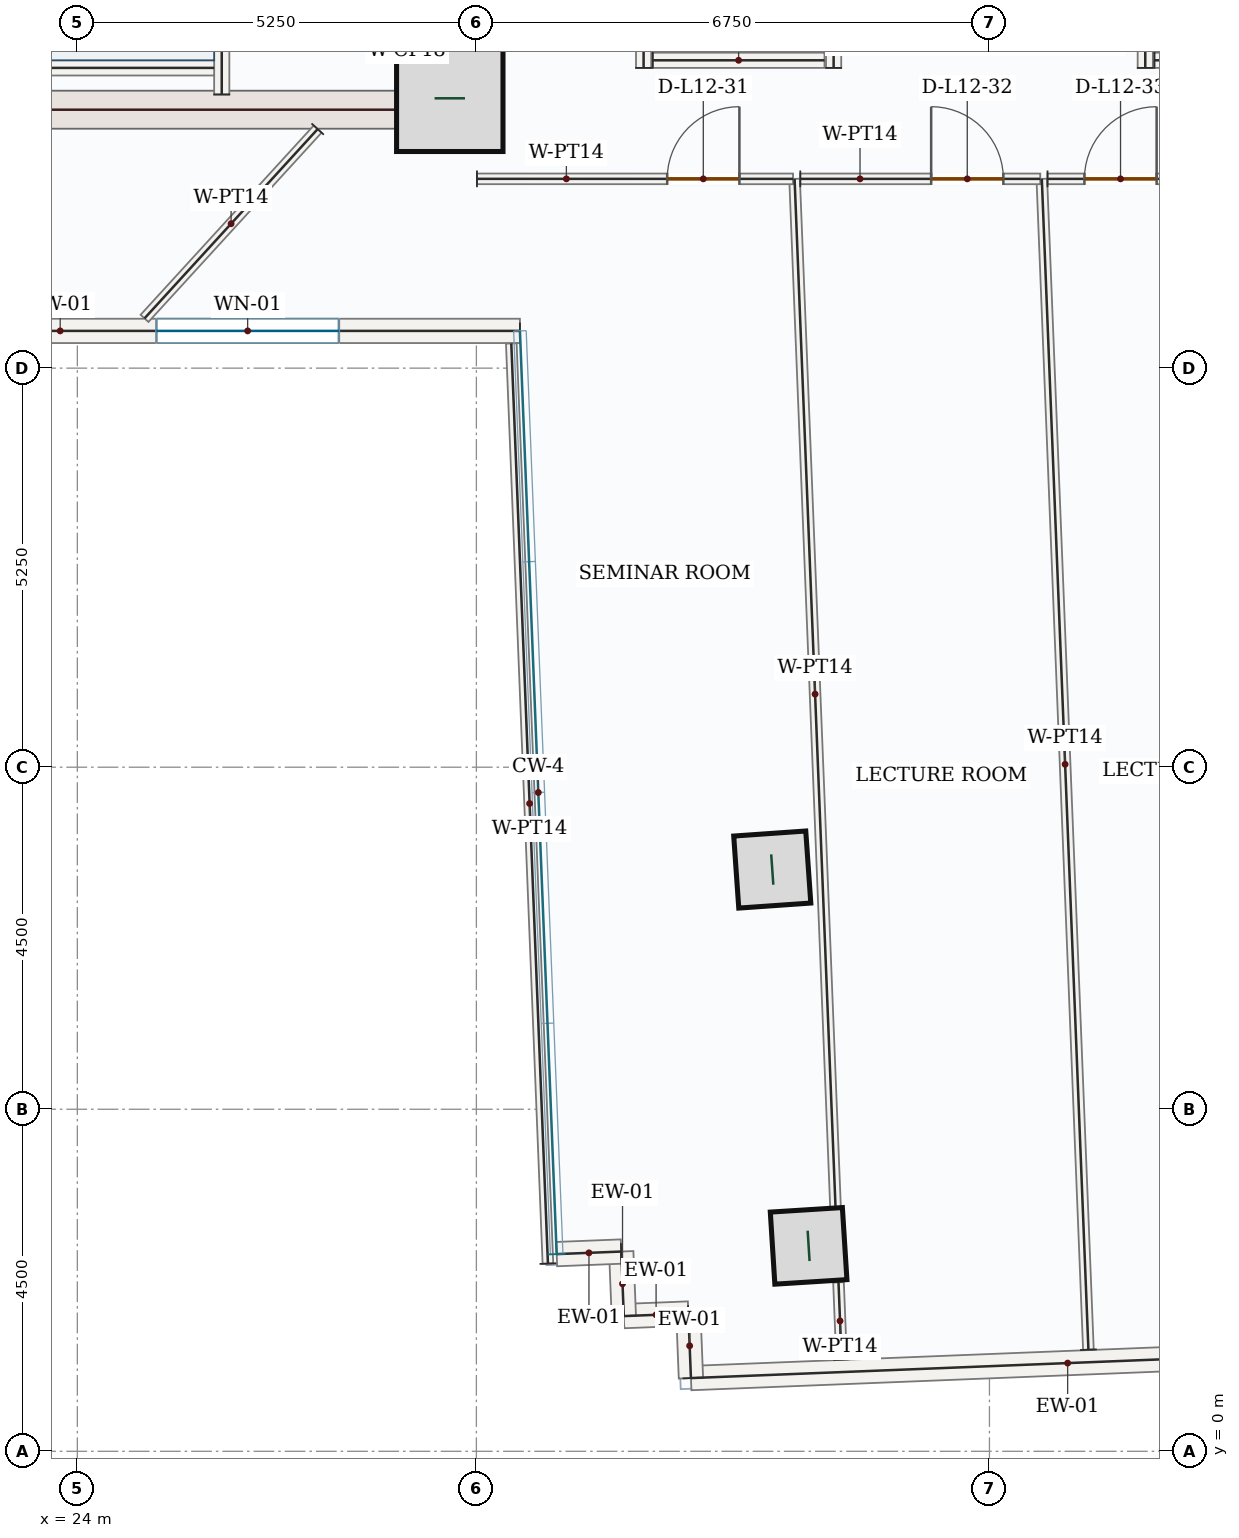
"""IFC4 building model, lengths in metres.
Left out: names, types, materials, properties, quantities, classifications, styles, units other than length and angle.
Written with IfcOpenShell. Run it as: python <this file> out.ifc"""

import sys

from ifc_helpers import new_model, si_unit, direction, frame, frame_2d, origin, origin_2d, place, context, subcontext, project, spatial, rectangle, hollow_rectangle, extrude, source, transform, mapped, element, fill, save


model = new_model("IFC4")
c1 = context("Model", 3, precision=1e-05, world=origin(), true_north=direction((0.0, 1.0)))
c2 = subcontext(c1, "Body", "Model", "MODEL_VIEW")
j1 = project(units=[si_unit("LENGTHUNIT", "METRE"), si_unit("PLANEANGLEUNIT", "RADIAN")], contexts=[c1])
p1 = place(None, origin())
s1 = spatial("IfcSite", under=j1, at=p1, CompositionType="ELEMENT")
p2 = place(p1, origin())
s2 = spatial("IfcBuilding", under=s1, at=p2, CompositionType="ELEMENT")
p3 = place(p2, frame((0.0, 0.0, 58.5)))
s3 = spatial("IfcBuildingStorey", under=s2, at=p3, CompositionType="ELEMENT", Elevation=58.5)
p4 = place(p3, frame((29.0, 17.4, 0.0), z_axis=(0.0, 0.0, 1.0), x_axis=(0.0, 1.0, 0.0)))
e1 = element("IfcWall", 1, at=p4, inside=s3, PredefinedType="SHEAR", context=c2, shape_type="SweptSolid", body=[
    extrude(rectangle(XDim=8.55, YDim=0.5, at=frame_2d((4.275, 0.0))), origin(), (0.0, 0.0, 1.0), 3.95),
])
p5 = place(p4, frame((6.65, 0.0, 0.0)))
e2 = element("IfcOpeningElement", 2, at=p5, cuts=e1, PredefinedType="OPENING", context=c2, shape_type="SweptSolid", body=[
    extrude(rectangle(XDim=1.1, YDim=2.2, at=frame_2d((0.55, 1.1))), frame((0.0, 0.26, 0.0), z_axis=(0.0, -1.0, 0.0), x_axis=(1.0, 0.0, 0.0)), (0.0, 0.0, 1.0), 0.52),
])
p6 = place(p4, frame((2.7, 0.0, 0.0)))
e3 = element("IfcOpeningElement", 3, at=p6, cuts=e1, PredefinedType="OPENING", context=c2, shape_type="SweptSolid", body=[
    extrude(rectangle(XDim=0.88, YDim=2.1, at=frame_2d((0.44, 1.05))), frame((0.0, 0.26, 0.0), z_axis=(0.0, -1.0, 0.0), x_axis=(1.0, 0.0, 0.0)), (0.0, 0.0, 1.0), 0.52),
])
p7 = place(p4, frame((4.6, 0.0, 0.0)))
e4 = element("IfcOpeningElement", 4, at=p7, cuts=e1, PredefinedType="OPENING", context=c2, shape_type="SweptSolid", body=[
    extrude(rectangle(XDim=0.88, YDim=2.1, at=frame_2d((0.44, 1.05))), frame((0.0, 0.26, 0.0), z_axis=(0.0, -1.0, 0.0), x_axis=(1.0, 0.0, 0.0)), (0.0, 0.0, 1.0), 0.52),
])
m1 = source(origin(), c2, "Body", "SweptSolid", [
    extrude(rectangle(XDim=7.0, YDim=0.5, at=frame_2d((3.5, 0.0))), origin(), (0.0, 0.0, 1.0), 3.95),
])
p8 = place(p3, frame((21.75, 17.65, 0.0), z_axis=(0.0, 0.0, 1.0), x_axis=(1.0, 0.0, 0.0)))
e5 = element("IfcWall", 5, at=p8, inside=s3, PredefinedType="SHEAR", context=c2, shape_type="MappedRepresentation", body=[
    mapped(m1, transform((0.0, 0.0, 0.0), x_axis=(1.0, 0.0, 0.0), y_axis=(0.0, 1.0, 0.0), z_axis=(0.0, 0.0, 1.0), scale=1.0)),
])
m2 = source(origin(), c2, "Body", "SweptSolid", [
    extrude(rectangle(XDim=1.4, YDim=1.4, at=origin_2d()), origin(), (0.0, 0.0, 1.0), 4.2),
])
p9 = place(p3, frame((28.9, 17.8, 0.0), z_axis=(0.0, 0.0, 1.0), x_axis=(1.0, 0.0, 0.0)))
e6 = element("IfcColumn", 6, at=p9, inside=s3, PredefinedType="COLUMN", context=c2, shape_type="MappedRepresentation", body=[
    mapped(m2, transform((0.0, 0.0, 0.0), x_axis=(1.0, 0.0, 0.0), y_axis=(0.0, 1.0, 0.0), z_axis=(0.0, 0.0, 1.0), scale=1.0)),
])
m3 = source(origin(), c2, "Body", "SweptSolid", [
    extrude(hollow_rectangle(XDim=0.95, YDim=0.95, WallThickness=0.05, at=origin_2d()), origin(), (0.0, 0.0, 1.0), 4.2),
])
for number, where, z_axis, x_axis in (
    (7, (33.143, 7.654, 0.0), (0.0, 0.0, 1.0), (-0.07, 0.998, 0.0)),
    (8, (33.621, 2.703, 0.0), (0.0, 0.0, 1.0), (-0.063, 0.998, 0.0)),
):
    element("IfcColumn", number, at=place(p3, frame(where, z_axis=z_axis, x_axis=x_axis)), inside=s3, PredefinedType="COLUMN", context=c2, shape_type="MappedRepresentation", body=[
        mapped(m3, transform((0.0, 0.0, 0.0), x_axis=(1.0, 0.0, 0.0), y_axis=(0.0, 1.0, 0.0), z_axis=(0.0, 0.0, 1.0), scale=1.0)),
    ])
m4 = source(origin(), c2, "Body", "SweptSolid", [
    extrude(rectangle(XDim=9.92, YDim=0.32, at=frame_2d((4.96, 0.0))), origin(), (0.0, 0.0, 1.0), 3.95),
])
p10 = place(p3, frame((41.985, 1.358, 0.0), z_axis=(0.0, 0.0, 1.0), x_axis=(-0.999207823998, -0.039796035749, 0.0)))
e9 = element("IfcWall", 9, at=p10, inside=s3, PredefinedType="SOLIDWALL", context=c2, shape_type="MappedRepresentation", body=[
    mapped(m4, transform((0.0, 0.0, 0.0), x_axis=(1.0, 0.0, 0.0), y_axis=(0.0, 1.0, 0.0), z_axis=(0.0, 0.0, 1.0), scale=1.0)),
])
m5 = source(origin(), c2, "Body", "SweptSolid", [
    extrude(rectangle(XDim=0.85, YDim=0.32, at=frame_2d((0.425, 0.0))), origin(), (0.0, 0.0, 1.0), 3.95),
])
p11 = place(p3, frame((32.073, 0.963, 0.0), z_axis=(0.0, 0.0, 1.0), x_axis=(-0.039922158152, 0.999202792875, 0.0)))
e10 = element("IfcWall", 10, at=p11, inside=s3, PredefinedType="SOLIDWALL", context=c2, shape_type="MappedRepresentation", body=[
    mapped(m5, transform((0.0, 0.0, 0.0), x_axis=(1.0, 0.0, 0.0), y_axis=(0.0, 1.0, 0.0), z_axis=(0.0, 0.0, 1.0), scale=1.0)),
])
m6 = source(origin(), c2, "Body", "SweptSolid", [
    extrude(rectangle(XDim=0.85, YDim=0.32, at=frame_2d((0.425, 0.0))), origin(), (0.0, 0.0, 1.0), 3.95),
])
for number, where, z_axis, x_axis in (
    (11, (32.039, 1.812, 0.0), (0.0, 0.0, 1.0), (-0.999, -0.04, 0.0)),
    (12, (31.19, 1.779, 0.0), (0.0, 0.0, 1.0), (-0.04, 0.999, 0.0)),
):
    element("IfcWall", number, at=place(p3, frame(where, z_axis=z_axis, x_axis=x_axis)), inside=s3, PredefinedType="SOLIDWALL", context=c2, shape_type="MappedRepresentation", body=[
        mapped(m6, transform((0.0, 0.0, 0.0), x_axis=(1.0, 0.0, 0.0), y_axis=(0.0, 1.0, 0.0), z_axis=(0.0, 0.0, 1.0), scale=1.0)),
    ])
p12 = place(p3, frame((31.156, 2.628, 0.0), z_axis=(0.0, 0.0, 1.0), x_axis=(-0.999214208752, -0.039635401209, 0.0)))
e13 = element("IfcWall", 13, at=p12, inside=s3, PredefinedType="SOLIDWALL", context=c2, shape_type="MappedRepresentation", body=[
    mapped(m5, transform((0.0, 0.0, 0.0), x_axis=(1.0, 0.0, 0.0), y_axis=(0.0, 1.0, 0.0), z_axis=(0.0, 0.0, 1.0), scale=1.0)),
])
p13 = place(p3, frame((29.823, 14.74, 0.0), z_axis=(0.0, 0.0, 1.0), x_axis=(-1.0, 0.0, 0.0)))
e14 = element("IfcWall", 14, at=p13, inside=s3, PredefinedType="SOLIDWALL", context=c2, shape_type="SweptSolid", body=[
    extrude(rectangle(XDim=7.165, YDim=0.32, at=frame_2d((3.583, 0.0))), origin(), (0.0, 0.0, 1.0), 3.95),
])
p14 = place(p13, frame((2.382, 0.0, 0.85)))
e15 = element("IfcOpeningElement", 15, at=p14, cuts=e14, PredefinedType="OPENING", context=c2, shape_type="SweptSolid", body=[
    extrude(rectangle(XDim=2.4, YDim=1.8, at=frame_2d((1.2, 0.9))), frame((0.0, 0.17, 0.0), z_axis=(0.0, -1.0, 0.0), x_axis=(1.0, 0.0, 0.0)), (0.0, 0.0, 1.0), 0.34),
])
p15 = place(p3, frame((25.9, 17.85, 0.0), z_axis=(0.0, 0.0, 1.0), x_axis=(0.0, 1.0, 0.0)))
e16 = element("IfcWall", 16, at=p15, inside=s3, PredefinedType="SOLIDWALL", context=c2, shape_type="SweptSolid", body=[
    extrude(rectangle(XDim=8.0, YDim=0.2, at=frame_2d((4.0, 0.0))), origin(), (0.0, 0.0, 1.0), 3.95),
])
p16 = place(p15, frame((6.3, 0.0, 0.0)))
e17 = element("IfcOpeningElement", 17, at=p16, cuts=e16, PredefinedType="OPENING", context=c2, shape_type="SweptSolid", body=[
    extrude(rectangle(XDim=1.05, YDim=2.15, at=frame_2d((0.525, 1.075))), frame((0.0, 0.11, 0.0), z_axis=(0.0, -1.0, 0.0), x_axis=(1.0, 0.0, 0.0)), (0.0, 0.0, 1.0), 0.22),
])
m7 = source(origin(), c2, "Body", "SweptSolid", [
    extrude(rectangle(XDim=3.25, YDim=0.2, at=frame_2d((1.625, 0.0))), origin(), (0.0, 0.0, 1.0), 3.95),
])
p17 = place(p3, frame((22.55, 18.2, 0.0), z_axis=(0.0, 0.0, 1.0), x_axis=(1.0, 0.0, 0.0)))
e18 = element("IfcWall", 18, at=p17, inside=s3, PredefinedType="SOLIDWALL", context=c2, shape_type="MappedRepresentation", body=[
    mapped(m7, transform((0.0, 0.0, 0.0), x_axis=(1.0, 0.0, 0.0), y_axis=(0.0, 1.0, 0.0), z_axis=(0.0, 0.0, 1.0), scale=1.0)),
])
m8 = source(origin(), c2, "Body", "SweptSolid", [
    extrude(rectangle(XDim=2.35, YDim=0.2, at=frame_2d((1.175, 0.0))), origin(), (0.0, 0.0, 1.0), 3.95),
])
for number, where, z_axis, x_axis in (
    (19, (31.45, 18.2, 0.0), (0.0, 0.0, 1.0), (0.0, 1.0, 0.0)),
    (20, (33.95, 18.2, 0.0), (0.0, 0.0, 1.0), (0.0, 1.0, 0.0)),
):
    element("IfcWall", number, at=place(p3, frame(where, z_axis=z_axis, x_axis=x_axis)), inside=s3, PredefinedType="SOLIDWALL", context=c2, shape_type="MappedRepresentation", body=[
        mapped(m8, transform((0.0, 0.0, 0.0), x_axis=(1.0, 0.0, 0.0), y_axis=(0.0, 1.0, 0.0), z_axis=(0.0, 0.0, 1.0), scale=1.0)),
    ])
m9 = source(origin(), c2, "Body", "SweptSolid", [
    extrude(rectangle(XDim=2.26, YDim=0.2, at=frame_2d((1.13, 0.0))), origin(), (0.0, 0.0, 1.0), 3.95),
])
p18 = place(p3, frame((31.57, 18.3, 0.0), z_axis=(0.0, 0.0, 1.0), x_axis=(1.0, 0.0, 0.0)))
e21 = element("IfcWall", 21, at=p18, inside=s3, PredefinedType="SOLIDWALL", context=c2, shape_type="MappedRepresentation", body=[
    mapped(m9, transform((0.0, 0.0, 0.0), x_axis=(1.0, 0.0, 0.0), y_axis=(0.0, 1.0, 0.0), z_axis=(0.0, 0.0, 1.0), scale=1.0)),
])
p19 = place(p3, frame((38.05, 18.2, 0.0), z_axis=(0.0, 0.0, 1.0), x_axis=(0.0, 1.0, 0.0)))
e22 = element("IfcWall", 22, at=p19, inside=s3, PredefinedType="SOLIDWALL", context=c2, shape_type="MappedRepresentation", body=[
    mapped(m8, transform((0.0, 0.0, 0.0), x_axis=(1.0, 0.0, 0.0), y_axis=(0.0, 1.0, 0.0), z_axis=(0.0, 0.0, 1.0), scale=1.0)),
])
p20 = place(p3, frame((38.17, 18.3, 0.0), z_axis=(0.0, 0.0, 1.0), x_axis=(1.0, 0.0, 0.0)))
e23 = element("IfcWall", 23, at=p20, inside=s3, PredefinedType="SOLIDWALL", context=c2, shape_type="MappedRepresentation", body=[
    mapped(m9, transform((0.0, 0.0, 0.0), x_axis=(1.0, 0.0, 0.0), y_axis=(0.0, 1.0, 0.0), z_axis=(0.0, 0.0, 1.0), scale=1.0)),
])
m10 = source(origin(), c2, "Body", "SweptSolid", [
    extrude(rectangle(XDim=15.416, YDim=0.14, at=frame_2d((7.708, 0.0))), origin(), (0.0, 0.0, 1.0), 3.95),
])
p21 = place(p3, frame((37.302, 1.336, 0.0), z_axis=(0.0, 0.0, 1.0), x_axis=(-0.039782723686, 0.999208354096, 0.0)))
e24 = element("IfcWall", 24, at=p21, inside=s3, PredefinedType="PARTITIONING", context=c2, shape_type="MappedRepresentation", body=[
    mapped(m10, transform((0.0, 0.0, 0.0), x_axis=(1.0, 0.0, 0.0), y_axis=(0.0, 1.0, 0.0), z_axis=(0.0, 0.0, 1.0), scale=1.0)),
])
p22 = place(p3, frame((36.764, 16.74, 0.0), z_axis=(0.0, 0.0, 1.0), x_axis=(1.0, 0.0, 0.0)))
e25 = element("IfcWall", 25, at=p22, inside=s3, PredefinedType="PARTITIONING", context=c2, shape_type="SweptSolid", body=[
    extrude(rectangle(XDim=3.157, YDim=0.14, at=frame_2d((1.579, 0.0))), origin(), (0.0, 0.0, 1.0), 3.95),
])
p23 = place(p22, frame((0.486, 0.0, 0.0)))
e26 = element("IfcOpeningElement", 26, at=p23, cuts=e25, PredefinedType="OPENING", context=c2, shape_type="SweptSolid", body=[
    extrude(rectangle(XDim=0.95, YDim=2.15, at=frame_2d((0.475, 1.075))), frame((0.0, 0.08, 0.0), z_axis=(0.0, -1.0, 0.0), x_axis=(1.0, 0.0, 0.0)), (0.0, 0.0, 1.0), 0.16),
])
m11 = source(origin(), c2, "Body", "SweptSolid", [
    extrude(rectangle(XDim=1.016, YDim=0.14, at=frame_2d((0.508, 0.0))), origin(), (0.0, 0.0, 1.0), 3.95),
])
p24 = place(p3, frame((34.055, 1.207, 0.0), z_axis=(0.0, 0.0, 1.0), x_axis=(-0.03988168596, 0.99920440908, 0.0)))
e27 = element("IfcWall", 27, at=p24, inside=s3, PredefinedType="PARTITIONING", context=c2, shape_type="MappedRepresentation", body=[
    mapped(m11, transform((0.0, 0.0, 0.0), x_axis=(1.0, 0.0, 0.0), y_axis=(0.0, 1.0, 0.0), z_axis=(0.0, 0.0, 1.0), scale=1.0)),
])
m12 = source(origin(), c2, "Body", "SweptSolid", [
    extrude(rectangle(XDim=13.568, YDim=0.14, at=frame_2d((6.784, 0.0))), origin(), (0.0, 0.0, 1.0), 3.95),
])
p25 = place(p3, frame((33.976, 3.183, 0.0), z_axis=(0.0, 0.0, 1.0), x_axis=(-0.039766111253, 0.99920901537, 0.0)))
e28 = element("IfcWall", 28, at=p25, inside=s3, PredefinedType="PARTITIONING", context=c2, shape_type="MappedRepresentation", body=[
    mapped(m12, transform((0.0, 0.0, 0.0), x_axis=(1.0, 0.0, 0.0), y_axis=(0.0, 1.0, 0.0), z_axis=(0.0, 0.0, 1.0), scale=1.0)),
])
p26 = place(p3, frame((33.511, 16.74, 0.0), z_axis=(0.0, 0.0, 1.0), x_axis=(1.0, 0.0, 0.0)))
e29 = element("IfcWall", 29, at=p26, inside=s3, PredefinedType="PARTITIONING", context=c2, shape_type="SweptSolid", body=[
    extrude(rectangle(XDim=3.157, YDim=0.14, at=frame_2d((1.579, 0.0))), origin(), (0.0, 0.0, 1.0), 3.95),
])
p27 = place(p26, frame((1.722, 0.0, 0.0)))
e30 = element("IfcOpeningElement", 30, at=p27, cuts=e29, PredefinedType="OPENING", context=c2, shape_type="SweptSolid", body=[
    extrude(rectangle(XDim=0.95, YDim=2.15, at=frame_2d((0.475, 1.075))), frame((0.0, 0.08, 0.0), z_axis=(0.0, -1.0, 0.0), x_axis=(1.0, 0.0, 0.0)), (0.0, 0.0, 1.0), 0.16),
])
m13 = source(origin(), c2, "Body", "SweptSolid", [
    extrude(rectangle(XDim=3.375, YDim=0.14, at=frame_2d((1.688, 0.0))), origin(), (0.0, 0.0, 1.0), 3.95),
])
p28 = place(p3, frame((27.162, 17.395, 0.0), z_axis=(0.0, 0.0, 1.0), x_axis=(-0.674974079893, -0.737841440604, 0.0)))
e31 = element("IfcWall", 31, at=p28, inside=s3, PredefinedType="PARTITIONING", context=c2, shape_type="MappedRepresentation", body=[
    mapped(m13, transform((0.0, 0.0, 0.0), x_axis=(1.0, 0.0, 0.0), y_axis=(0.0, 1.0, 0.0), z_axis=(0.0, 0.0, 1.0), scale=1.0)),
])
p29 = place(p3, frame((29.258, 16.74, 0.0), z_axis=(0.0, 0.0, 1.0), x_axis=(0.999999998277, -5.8706117e-05, 0.0)))
e32 = element("IfcWall", 32, at=p29, inside=s3, PredefinedType="PARTITIONING", context=c2, shape_type="SweptSolid", body=[
    extrude(rectangle(XDim=4.159, YDim=0.14, at=frame_2d((2.079, 0.0))), origin(), (0.0, 0.0, 1.0), 3.95),
])
p30 = place(p29, frame((2.503, 0.0, 0.0)))
e33 = element("IfcOpeningElement", 33, at=p30, cuts=e32, PredefinedType="OPENING", context=c2, shape_type="SweptSolid", body=[
    extrude(rectangle(XDim=0.95, YDim=2.15, at=frame_2d((0.475, 1.075))), frame((0.0, 0.08, 0.0), z_axis=(0.0, -1.0, 0.0), x_axis=(1.0, 0.0, 0.0)), (0.0, 0.0, 1.0), 0.16),
])
m14 = source(origin(), c2, "Body", "SweptSolid", [
    extrude(rectangle(XDim=12.115, YDim=0.14, at=frame_2d((6.058, 0.0))), origin(), (0.0, 0.0, 1.0), 3.95),
])
p31 = place(p3, frame((30.191, 2.469, 0.0), z_axis=(0.0, 0.0, 1.0), x_axis=(-0.039799837716, 0.999207672568, 0.0)))
e34 = element("IfcWall", 34, at=p31, inside=s3, PredefinedType="PARTITIONING", context=c2, shape_type="MappedRepresentation", body=[
    mapped(m14, transform((0.0, 0.0, 0.0), x_axis=(1.0, 0.0, 0.0), y_axis=(0.0, 1.0, 0.0), z_axis=(0.0, 0.0, 1.0), scale=1.0)),
])
m15 = source(origin(), c2, "Body", "SweptSolid", [
    extrude(rectangle(XDim=2.4, YDim=1.8, at=frame_2d((1.2, 0.9))), frame((0.0, 0.03, 0.0), z_axis=(0.0, -1.0, 0.0), x_axis=(1.0, 0.0, 0.0)), (0.0, 0.0, 1.0), 0.06),
])
p32 = place(p14, origin())
e35 = element("IfcWindow", 35, at=p32, inside=s3, PartitioningType="DOUBLE_PANEL_VERTICAL", PredefinedType="WINDOW", context=c2, shape_type="MappedRepresentation", body=[
    mapped(m15, transform((0.0, 0.0, 0.0), x_axis=(1.0, 0.0, 0.0), y_axis=(0.0, 1.0, 0.0), z_axis=(0.0, 0.0, 1.0), scale=1.0)),
])
fill(e15, e35)
m16 = source(origin(), c2, "Body", "SweptSolid", [
    extrude(rectangle(XDim=0.95, YDim=2.15, at=frame_2d((0.475, 1.075))), frame((0.0, 0.025, 0.0), z_axis=(0.0, -1.0, 0.0), x_axis=(1.0, 0.0, 0.0)), (0.0, 0.0, 1.0), 0.05),
])
p33 = place(p30, origin())
e36 = element("IfcDoor", 36, at=p33, inside=s3, OperationType="SINGLE_SWING_RIGHT", PredefinedType="DOOR", context=c2, shape_type="MappedRepresentation", body=[
    mapped(m16, transform((0.0, 0.0, 0.0), x_axis=(1.0, 0.0, 0.0), y_axis=(0.0, 1.0, 0.0), z_axis=(0.0, 0.0, 1.0), scale=1.0)),
])
fill(e33, e36)
p34 = place(p27, origin())
e37 = element("IfcDoor", 37, at=p34, inside=s3, OperationType="SINGLE_SWING_LEFT", PredefinedType="DOOR", context=c2, shape_type="MappedRepresentation", body=[
    mapped(m16, transform((0.0, 0.0, 0.0), x_axis=(1.0, 0.0, 0.0), y_axis=(0.0, 1.0, 0.0), z_axis=(0.0, 0.0, 1.0), scale=1.0)),
])
fill(e30, e37)
p35 = place(p23, origin())
e38 = element("IfcDoor", 38, at=p35, inside=s3, OperationType="SINGLE_SWING_RIGHT", PredefinedType="DOOR", context=c2, shape_type="MappedRepresentation", body=[
    mapped(m16, transform((0.0, 0.0, 0.0), x_axis=(1.0, 0.0, 0.0), y_axis=(0.0, 1.0, 0.0), z_axis=(0.0, 0.0, 1.0), scale=1.0)),
])
fill(e26, e38)
save(model, sys.argv[1])
